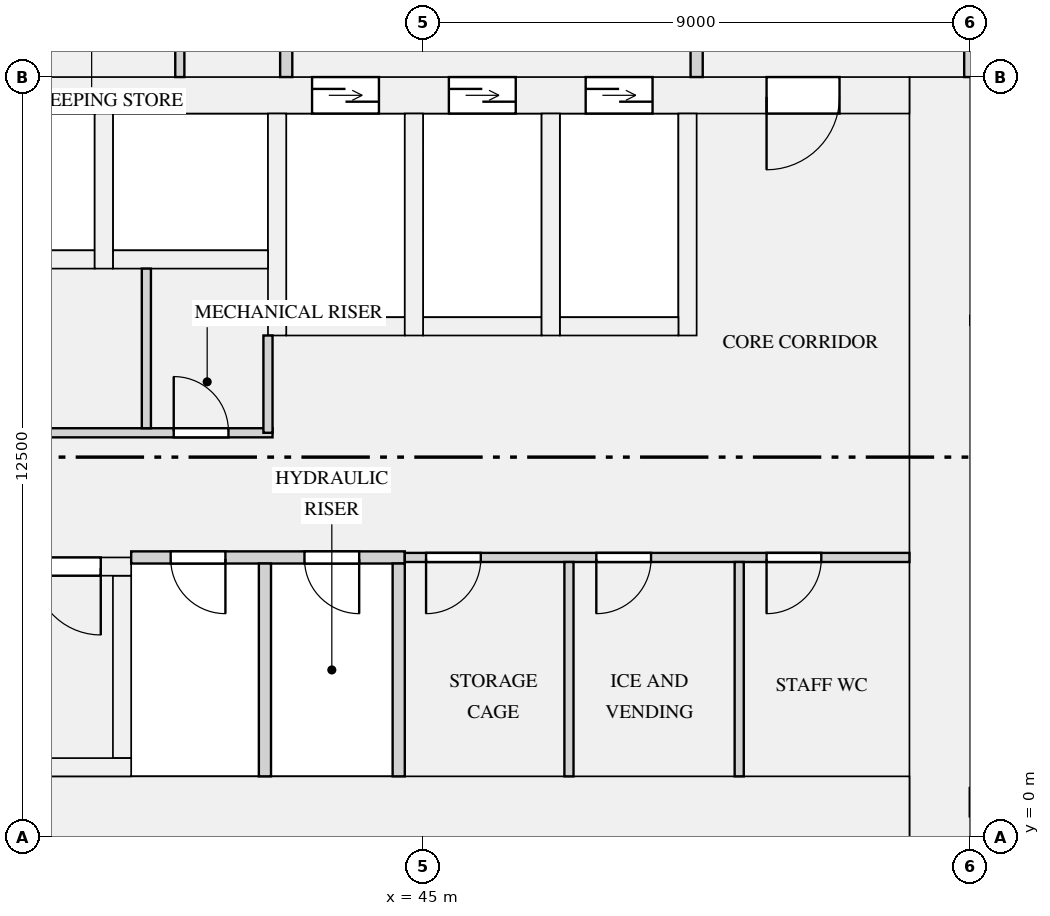
"""IFC4 building model, lengths in metres.
Left out: names, types, materials, properties, quantities, classifications, styles, units other than length and angle.
Written with IfcOpenShell. Run it as: python <this file> out.ifc"""

import sys

from ifc_helpers import new_model, si_unit, direction, frame, frame_2d, origin, place, context, subcontext, project, spatial, rectangle, extrude, element, fill, save


model = new_model("IFC4")
c1 = context("Model", 3, precision=1e-05, world=origin(), true_north=direction((0.0, 1.0)))
c2 = subcontext(c1, "Body", "Model", "MODEL_VIEW")
j1 = project(units=[si_unit("LENGTHUNIT", "METRE"), si_unit("PLANEANGLEUNIT", "RADIAN")], contexts=[c1])
p1 = place(None, origin())
s1 = spatial("IfcSite", under=j1, at=p1, CompositionType="ELEMENT")
p2 = place(p1, origin())
s2 = spatial("IfcBuilding", under=s1, at=p2, CompositionType="ELEMENT")
p3 = place(p2, frame((0.0, 0.0, 60.45)))
s3 = spatial("IfcBuildingStorey", under=s2, at=p3, CompositionType="ELEMENT", Elevation=60.45)
p4 = place(p3, frame((53.5, 0.0, 0.0), z_axis=(0.0, 0.0, 1.0), x_axis=(0.0, 1.0, 0.0)))
e1 = element("IfcWall", 1, at=p4, inside=s3, PredefinedType="SHEAR", context=c2, shape_type="SweptSolid", body=[
    extrude(rectangle(XDim=12.5, YDim=1.0, at=frame_2d((6.25, 0.0))), origin(), (0.0, 0.0, 1.0), 3.15),
])
p5 = place(p3, frame((19.0, 0.5, 0.0), z_axis=(0.0, 0.0, 1.0), x_axis=(1.0, 0.0, 0.0)))
e2 = element("IfcWall", 2, at=p5, inside=s3, PredefinedType="SHEAR", context=c2, shape_type="SweptSolid", body=[
    extrude(rectangle(XDim=34.0, YDim=1.0, at=frame_2d((17.0, 0.0))), origin(), (0.0, 0.0, 1.0), 3.15),
])
p6 = place(p3, frame((19.0, 12.2, 0.0), z_axis=(0.0, 0.0, 1.0), x_axis=(1.0, 0.0, 0.0)))
e3 = element("IfcWall", 3, at=p6, inside=s3, PredefinedType="SHEAR", context=c2, shape_type="SweptSolid", body=[
    extrude(rectangle(XDim=34.0, YDim=0.6, at=frame_2d((17.0, 0.0))), origin(), (0.0, 0.0, 1.0), 3.15),
])
p7 = place(p6, frame((4.475, 0.0, 0.0)))
e4 = element("IfcOpeningElement", 4, at=p7, cuts=e3, PredefinedType="OPENING", context=c2, shape_type="SweptSolid", body=[
    extrude(rectangle(XDim=1.2, YDim=2.1, at=frame_2d((0.6, 1.05))), frame((0.0, 0.31, 0.0), z_axis=(0.0, -1.0, 0.0), x_axis=(1.0, 0.0, 0.0)), (0.0, 0.0, 1.0), 0.62),
])
p8 = place(p6, frame((7.325, 0.0, 0.0)))
e5 = element("IfcOpeningElement", 5, at=p8, cuts=e3, PredefinedType="OPENING", context=c2, shape_type="SweptSolid", body=[
    extrude(rectangle(XDim=1.2, YDim=2.1, at=frame_2d((0.6, 1.05))), frame((0.0, 0.31, 0.0), z_axis=(0.0, -1.0, 0.0), x_axis=(1.0, 0.0, 0.0)), (0.0, 0.0, 1.0), 0.62),
])
p9 = place(p6, frame((10.175, 0.0, 0.0)))
e6 = element("IfcOpeningElement", 6, at=p9, cuts=e3, PredefinedType="OPENING", context=c2, shape_type="SweptSolid", body=[
    extrude(rectangle(XDim=1.2, YDim=2.1, at=frame_2d((0.6, 1.05))), frame((0.0, 0.31, 0.0), z_axis=(0.0, -1.0, 0.0), x_axis=(1.0, 0.0, 0.0)), (0.0, 0.0, 1.0), 0.62),
])
p10 = place(p6, frame((13.025, 0.0, 0.0)))
e7 = element("IfcOpeningElement", 7, at=p10, cuts=e3, PredefinedType="OPENING", context=c2, shape_type="SweptSolid", body=[
    extrude(rectangle(XDim=1.2, YDim=2.1, at=frame_2d((0.6, 1.05))), frame((0.0, 0.31, 0.0), z_axis=(0.0, -1.0, 0.0), x_axis=(1.0, 0.0, 0.0)), (0.0, 0.0, 1.0), 0.62),
])
p11 = place(p6, frame((15.875, 0.0, 0.0)))
e8 = element("IfcOpeningElement", 8, at=p11, cuts=e3, PredefinedType="OPENING", context=c2, shape_type="SweptSolid", body=[
    extrude(rectangle(XDim=1.2, YDim=2.1, at=frame_2d((0.6, 1.05))), frame((0.0, 0.31, 0.0), z_axis=(0.0, -1.0, 0.0), x_axis=(1.0, 0.0, 0.0)), (0.0, 0.0, 1.0), 0.62),
])
p12 = place(p6, frame((24.175, 0.0, 0.0)))
e9 = element("IfcOpeningElement", 9, at=p12, cuts=e3, PredefinedType="OPENING", context=c2, shape_type="SweptSolid", body=[
    extrude(rectangle(XDim=1.1, YDim=2.1, at=frame_2d((0.55, 1.05))), frame((0.0, 0.31, 0.0), z_axis=(0.0, -1.0, 0.0), x_axis=(1.0, 0.0, 0.0)), (0.0, 0.0, 1.0), 0.62),
])
p13 = place(p6, frame((26.425, 0.0, 0.0)))
e10 = element("IfcOpeningElement", 10, at=p13, cuts=e3, PredefinedType="OPENING", context=c2, shape_type="SweptSolid", body=[
    extrude(rectangle(XDim=1.1, YDim=2.1, at=frame_2d((0.55, 1.05))), frame((0.0, 0.31, 0.0), z_axis=(0.0, -1.0, 0.0), x_axis=(1.0, 0.0, 0.0)), (0.0, 0.0, 1.0), 0.62),
])
p14 = place(p6, frame((28.675, 0.0, 0.0)))
e11 = element("IfcOpeningElement", 11, at=p14, cuts=e3, PredefinedType="OPENING", context=c2, shape_type="SweptSolid", body=[
    extrude(rectangle(XDim=1.1, YDim=2.1, at=frame_2d((0.55, 1.05))), frame((0.0, 0.31, 0.0), z_axis=(0.0, -1.0, 0.0), x_axis=(1.0, 0.0, 0.0)), (0.0, 0.0, 1.0), 0.62),
])
p15 = place(p6, frame((1.15, 0.0, 0.0)))
e12 = element("IfcOpeningElement", 12, at=p15, cuts=e3, PredefinedType="OPENING", context=c2, shape_type="SweptSolid", body=[
    extrude(rectangle(XDim=1.2, YDim=2.1, at=frame_2d((0.6, 1.05))), frame((0.0, 0.31, 0.0), z_axis=(0.0, -1.0, 0.0), x_axis=(1.0, 0.0, 0.0)), (0.0, 0.0, 1.0), 0.62),
])
p16 = place(p6, frame((31.65, 0.0, 0.0)))
e13 = element("IfcOpeningElement", 13, at=p16, cuts=e3, PredefinedType="OPENING", context=c2, shape_type="SweptSolid", body=[
    extrude(rectangle(XDim=1.2, YDim=2.1, at=frame_2d((0.6, 1.05))), frame((0.0, 0.31, 0.0), z_axis=(0.0, -1.0, 0.0), x_axis=(1.0, 0.0, 0.0)), (0.0, 0.0, 1.0), 0.62),
])
for number, where, z_axis, x_axis in (
    (14, (37.05, 9.5, 0.0), (0.0, 0.0, 1.0), (1.0, 0.0, 0.0)),
    (15, (39.9, 9.5, 0.0), (0.0, 0.0, 1.0), (1.0, 0.0, 0.0)),
):
    element("IfcWall", number, at=place(p3, frame(where, z_axis=z_axis, x_axis=x_axis)), inside=s3, PredefinedType="SHEAR", context=c2, shape_type="SweptSolid", body=[
        extrude(rectangle(XDim=2.55, YDim=0.3, at=frame_2d((1.275, 0.0))), origin(), (0.0, 0.0, 1.0), 3.15),
    ])
p17 = place(p3, frame((39.75, 9.35, 0.0), z_axis=(0.0, 0.0, 1.0), x_axis=(0.0, 1.0, 0.0)))
e16 = element("IfcWall", 16, at=p17, inside=s3, PredefinedType="SHEAR", context=c2, shape_type="SweptSolid", body=[
    extrude(rectangle(XDim=2.55, YDim=0.3, at=frame_2d((1.275, 0.0))), origin(), (0.0, 0.0, 1.0), 3.15),
])
p18 = place(p3, frame((42.75, 8.4, 0.0), z_axis=(0.0, 0.0, 1.0), x_axis=(1.0, 0.0, 0.0)))
e17 = element("IfcWall", 17, at=p18, inside=s3, PredefinedType="SHEAR", context=c2, shape_type="SweptSolid", body=[
    extrude(rectangle(XDim=1.95, YDim=0.3, at=frame_2d((0.975, 0.0))), origin(), (0.0, 0.0, 1.0), 3.15),
])
p19 = place(p3, frame((42.6, 8.25, 0.0), z_axis=(0.0, 0.0, 1.0), x_axis=(0.0, 1.0, 0.0)))
e18 = element("IfcWall", 18, at=p19, inside=s3, PredefinedType="SHEAR", context=c2, shape_type="SweptSolid", body=[
    extrude(rectangle(XDim=3.65, YDim=0.3, at=frame_2d((1.825, 0.0))), origin(), (0.0, 0.0, 1.0), 3.15),
])
p20 = place(p3, frame((45.0, 8.4, 0.0), z_axis=(0.0, 0.0, 1.0), x_axis=(1.0, 0.0, 0.0)))
e19 = element("IfcWall", 19, at=p20, inside=s3, PredefinedType="SHEAR", context=c2, shape_type="SweptSolid", body=[
    extrude(rectangle(XDim=1.95, YDim=0.3, at=frame_2d((0.975, 0.0))), origin(), (0.0, 0.0, 1.0), 3.15),
])
p21 = place(p3, frame((44.85, 8.25, 0.0), z_axis=(0.0, 0.0, 1.0), x_axis=(0.0, 1.0, 0.0)))
e20 = element("IfcWall", 20, at=p21, inside=s3, PredefinedType="SHEAR", context=c2, shape_type="SweptSolid", body=[
    extrude(rectangle(XDim=3.65, YDim=0.3, at=frame_2d((1.825, 0.0))), origin(), (0.0, 0.0, 1.0), 3.15),
])
p22 = place(p3, frame((47.25, 8.4, 0.0), z_axis=(0.0, 0.0, 1.0), x_axis=(1.0, 0.0, 0.0)))
e21 = element("IfcWall", 21, at=p22, inside=s3, PredefinedType="SHEAR", context=c2, shape_type="SweptSolid", body=[
    extrude(rectangle(XDim=1.95, YDim=0.3, at=frame_2d((0.975, 0.0))), origin(), (0.0, 0.0, 1.0), 3.15),
])
for number, where, z_axis, x_axis in (
    (22, (47.1, 8.25, 0.0), (0.0, 0.0, 1.0), (0.0, 1.0, 0.0)),
    (23, (49.35, 8.25, 0.0), (0.0, 0.0, 1.0), (0.0, 1.0, 0.0)),
):
    element("IfcWall", number, at=place(p3, frame(where, z_axis=z_axis, x_axis=x_axis)), inside=s3, PredefinedType="SHEAR", context=c2, shape_type="SweptSolid", body=[
        extrude(rectangle(XDim=3.65, YDim=0.3, at=frame_2d((1.825, 0.0))), origin(), (0.0, 0.0, 1.0), 3.15),
    ])
p23 = place(p3, frame((31.8, 1.15, 0.0), z_axis=(0.0, 0.0, 1.0), x_axis=(1.0, 0.0, 0.0)))
e24 = element("IfcWall", 24, at=p23, inside=s3, PredefinedType="SHEAR", context=c2, shape_type="SweptSolid", body=[
    extrude(rectangle(XDim=8.4, YDim=0.3, at=frame_2d((4.2, 0.0))), origin(), (0.0, 0.0, 1.0), 3.15),
])
p24 = place(p3, frame((31.8, 4.45, 0.0), z_axis=(0.0, 0.0, 1.0), x_axis=(1.0, 0.0, 0.0)))
e25 = element("IfcWall", 25, at=p24, inside=s3, PredefinedType="SHEAR", context=c2, shape_type="SweptSolid", body=[
    extrude(rectangle(XDim=8.4, YDim=0.3, at=frame_2d((4.2, 0.0))), origin(), (0.0, 0.0, 1.0), 3.15),
])
p25 = place(p24, frame((6.8, 0.0, 0.0)))
e26 = element("IfcOpeningElement", 26, at=p25, cuts=e25, PredefinedType="OPENING", context=c2, shape_type="SweptSolid", body=[
    extrude(rectangle(XDim=1.1, YDim=2.1, at=frame_2d((0.55, 1.05))), frame((0.0, 0.16, 0.0), z_axis=(0.0, -1.0, 0.0), x_axis=(1.0, 0.0, 0.0)), (0.0, 0.0, 1.0), 0.32),
])
p26 = place(p3, frame((40.05, 1.3, 0.0), z_axis=(0.0, 0.0, 1.0), x_axis=(0.0, 1.0, 0.0)))
e27 = element("IfcWall", 27, at=p26, inside=s3, PredefinedType="SHEAR", context=c2, shape_type="SweptSolid", body=[
    extrude(rectangle(XDim=3.0, YDim=0.3, at=frame_2d((1.5, 0.0))), origin(), (0.0, 0.0, 1.0), 3.15),
])
p27 = place(p3, frame((40.2, 4.6, 0.0), z_axis=(0.0, 0.0, 1.0), x_axis=(1.0, 0.0, 0.0)))
e28 = element("IfcWall", 28, at=p27, inside=s3, PredefinedType="PARTITIONING", context=c2, shape_type="SweptSolid", body=[
    extrude(rectangle(XDim=4.5, YDim=0.2, at=frame_2d((2.25, 0.0))), origin(), (0.0, 0.0, 1.0), 2.83),
])
p28 = place(p27, frame((0.65, 0.0, 0.0)))
e29 = element("IfcOpeningElement", 29, at=p28, cuts=e28, PredefinedType="OPENING", context=c2, shape_type="SweptSolid", body=[
    extrude(rectangle(XDim=0.9, YDim=2.1, at=frame_2d((0.45, 1.05))), frame((0.0, 0.11, 0.0), z_axis=(0.0, -1.0, 0.0), x_axis=(1.0, 0.0, 0.0)), (0.0, 0.0, 1.0), 0.22),
])
p29 = place(p27, frame((2.85, 0.0, 0.0)))
e30 = element("IfcOpeningElement", 30, at=p29, cuts=e28, PredefinedType="OPENING", context=c2, shape_type="SweptSolid", body=[
    extrude(rectangle(XDim=0.9, YDim=2.1, at=frame_2d((0.45, 1.05))), frame((0.0, 0.11, 0.0), z_axis=(0.0, -1.0, 0.0), x_axis=(1.0, 0.0, 0.0)), (0.0, 0.0, 1.0), 0.22),
])
p30 = place(p3, frame((44.7, 4.6, 0.0), z_axis=(0.0, 0.0, 1.0), x_axis=(1.0, 0.0, 0.0)))
e31 = element("IfcWall", 31, at=p30, inside=s3, PredefinedType="PARTITIONING", context=c2, shape_type="SweptSolid", body=[
    extrude(rectangle(XDim=8.3, YDim=0.15, at=frame_2d((4.15, 0.0))), origin(), (0.0, 0.0, 1.0), 2.83),
])
p31 = place(p30, frame((0.35, 0.0, 0.0)))
e32 = element("IfcOpeningElement", 32, at=p31, cuts=e31, PredefinedType="OPENING", context=c2, shape_type="SweptSolid", body=[
    extrude(rectangle(XDim=0.9, YDim=2.1, at=frame_2d((0.45, 1.05))), frame((0.0, 0.085, 0.0), z_axis=(0.0, -1.0, 0.0), x_axis=(1.0, 0.0, 0.0)), (0.0, 0.0, 1.0), 0.17),
])
p32 = place(p30, frame((3.15, 0.0, 0.0)))
e33 = element("IfcOpeningElement", 33, at=p32, cuts=e31, PredefinedType="OPENING", context=c2, shape_type="SweptSolid", body=[
    extrude(rectangle(XDim=0.9, YDim=2.1, at=frame_2d((0.45, 1.05))), frame((0.0, 0.085, 0.0), z_axis=(0.0, -1.0, 0.0), x_axis=(1.0, 0.0, 0.0)), (0.0, 0.0, 1.0), 0.17),
])
p33 = place(p30, frame((5.95, 0.0, 0.0)))
e34 = element("IfcOpeningElement", 34, at=p33, cuts=e31, PredefinedType="OPENING", context=c2, shape_type="SweptSolid", body=[
    extrude(rectangle(XDim=0.9, YDim=2.1, at=frame_2d((0.45, 1.05))), frame((0.0, 0.085, 0.0), z_axis=(0.0, -1.0, 0.0), x_axis=(1.0, 0.0, 0.0)), (0.0, 0.0, 1.0), 0.17),
])
p34 = place(p3, frame((35.375, 6.65, 0.0), z_axis=(0.0, 0.0, 1.0), x_axis=(1.0, 0.0, 0.0)))
e35 = element("IfcWall", 35, at=p34, inside=s3, PredefinedType="PARTITIONING", context=c2, shape_type="SweptSolid", body=[
    extrude(rectangle(XDim=7.15, YDim=0.15, at=frame_2d((3.575, 0.0))), origin(), (0.0, 0.0, 1.0), 2.83),
])
p35 = place(p34, frame((0.525, 0.0, 0.0)))
e36 = element("IfcOpeningElement", 36, at=p35, cuts=e35, PredefinedType="OPENING", context=c2, shape_type="SweptSolid", body=[
    extrude(rectangle(XDim=0.9, YDim=2.1, at=frame_2d((0.45, 1.05))), frame((0.0, 0.085, 0.0), z_axis=(0.0, -1.0, 0.0), x_axis=(1.0, 0.0, 0.0)), (0.0, 0.0, 1.0), 0.17),
])
p36 = place(p34, frame((5.525, 0.0, 0.0)))
e37 = element("IfcOpeningElement", 37, at=p36, cuts=e35, PredefinedType="OPENING", context=c2, shape_type="SweptSolid", body=[
    extrude(rectangle(XDim=0.9, YDim=2.1, at=frame_2d((0.45, 1.05))), frame((0.0, 0.085, 0.0), z_axis=(0.0, -1.0, 0.0), x_axis=(1.0, 0.0, 0.0)), (0.0, 0.0, 1.0), 0.17),
])
for number, where, z_axis, x_axis in (
    (38, (42.4, 1.0, 0.0), (0.0, 0.0, 1.0), (0.0, 1.0, 0.0)),
    (39, (44.6, 1.0, 0.0), (0.0, 0.0, 1.0), (0.0, 1.0, 0.0)),
):
    element("IfcWall", number, at=place(p3, frame(where, z_axis=z_axis, x_axis=x_axis)), inside=s3, PredefinedType="PARTITIONING", context=c2, shape_type="SweptSolid", body=[
        extrude(rectangle(XDim=3.5, YDim=0.2, at=frame_2d((1.75, 0.0))), origin(), (0.0, 0.0, 1.0), 2.83),
    ])
for number, where, z_axis, x_axis in (
    (40, (47.4, 1.0, 0.0), (0.0, 0.0, 1.0), (0.0, 1.0, 0.0)),
    (41, (50.2, 1.0, 0.0), (0.0, 0.0, 1.0), (0.0, 1.0, 0.0)),
):
    element("IfcWall", number, at=place(p3, frame(where, z_axis=z_axis, x_axis=x_axis)), inside=s3, PredefinedType="PARTITIONING", context=c2, shape_type="SweptSolid", body=[
        extrude(rectangle(XDim=3.525, YDim=0.15, at=frame_2d((1.762, 0.0))), origin(), (0.0, 0.0, 1.0), 2.83),
    ])
p37 = place(p3, frame((42.45, 6.65, 0.0), z_axis=(0.0, 0.0, 1.0), x_axis=(0.0, 1.0, 0.0)))
e42 = element("IfcWall", 42, at=p37, inside=s3, PredefinedType="PARTITIONING", context=c2, shape_type="SweptSolid", body=[
    extrude(rectangle(XDim=1.6, YDim=0.15, at=frame_2d((0.8, 0.0))), origin(), (0.0, 0.0, 1.0), 2.83),
])
p38 = place(p3, frame((40.45, 6.725, 0.0), z_axis=(0.0, 0.0, 1.0), x_axis=(0.0, 1.0, 0.0)))
e43 = element("IfcWall", 43, at=p38, inside=s3, PredefinedType="PARTITIONING", context=c2, shape_type="SweptSolid", body=[
    extrude(rectangle(XDim=2.625, YDim=0.15, at=frame_2d((1.312, 0.0))), origin(), (0.0, 0.0, 1.0), 2.83),
])
p39 = place(p3, frame((41.0, 12.5, 0.0), z_axis=(0.0, 0.0, 1.0), x_axis=(0.0, 1.0, 0.0)))
e44 = element("IfcWall", 44, at=p39, inside=s3, PredefinedType="PARTITIONING", context=c2, shape_type="SweptSolid", body=[
    extrude(rectangle(XDim=1.925, YDim=0.15, at=frame_2d((0.962, 0.0))), origin(), (0.0, 0.0, 1.0), 2.83),
])
p40 = place(p3, frame((42.75, 12.5, 0.0), z_axis=(0.0, 0.0, 1.0), x_axis=(0.0, 1.0, 0.0)))
e45 = element("IfcWall", 45, at=p40, inside=s3, PredefinedType="PARTITIONING", context=c2, shape_type="SweptSolid", body=[
    extrude(rectangle(XDim=3.4, YDim=0.2, at=frame_2d((1.7, 0.0))), origin(), (0.0, 0.0, 1.0), 2.83),
])
p41 = place(p40, frame((2.2, 0.0, 0.0)))
e46 = element("IfcOpeningElement", 46, at=p41, cuts=e45, PredefinedType="OPENING", context=c2, shape_type="SweptSolid", body=[
    extrude(rectangle(XDim=1.0, YDim=2.1, at=frame_2d((0.5, 1.05))), frame((0.0, 0.11, 0.0), z_axis=(0.0, -1.0, 0.0), x_axis=(1.0, 0.0, 0.0)), (0.0, 0.0, 1.0), 0.22),
])
p42 = place(p3, frame((49.5, 12.5, 0.0), z_axis=(0.0, 0.0, 1.0), x_axis=(0.0, 1.0, 0.0)))
e47 = element("IfcWall", 47, at=p42, inside=s3, PredefinedType="PARTITIONING", context=c2, shape_type="SweptSolid", body=[
    extrude(rectangle(XDim=3.4, YDim=0.2, at=frame_2d((1.7, 0.0))), origin(), (0.0, 0.0, 1.0), 2.83),
])
p43 = place(p42, frame((1.15, 0.0, 0.0)))
e48 = element("IfcOpeningElement", 48, at=p43, cuts=e47, PredefinedType="OPENING", context=c2, shape_type="SweptSolid", body=[
    extrude(rectangle(XDim=1.1, YDim=2.1, at=frame_2d((0.55, 1.05))), frame((0.0, 0.11, 0.0), z_axis=(0.0, -1.0, 0.0), x_axis=(1.0, 0.0, 0.0)), (0.0, 0.0, 1.0), 0.22),
])
p44 = place(p3, frame((54.0, 12.5, 0.0), z_axis=(0.0, 0.0, 1.0), x_axis=(0.0, 1.0, 0.0)))
e49 = element("IfcWall", 49, at=p44, inside=s3, PredefinedType="PARTITIONING", context=c2, shape_type="SweptSolid", body=[
    extrude(rectangle(XDim=3.4, YDim=0.2, at=frame_2d((1.7, 0.0))), origin(), (0.0, 0.0, 1.0), 2.83),
])
p45 = place(p12, origin())
e50 = element("IfcDoor", 50, at=p45, inside=s3, OperationType="DOUBLE_DOOR_SLIDING", PredefinedType="DOOR", context=c2, shape_type="SweptSolid", body=[
    extrude(rectangle(XDim=1.1, YDim=2.1, at=frame_2d((0.55, 1.05))), frame((0.0, 0.025, 0.0), z_axis=(0.0, -1.0, 0.0), x_axis=(1.0, 0.0, 0.0)), (0.0, 0.0, 1.0), 0.05),
])
fill(e9, e50)
p46 = place(p13, origin())
e51 = element("IfcDoor", 51, at=p46, inside=s3, OperationType="DOUBLE_DOOR_SLIDING", PredefinedType="DOOR", context=c2, shape_type="SweptSolid", body=[
    extrude(rectangle(XDim=1.1, YDim=2.1, at=frame_2d((0.55, 1.05))), frame((0.0, 0.025, 0.0), z_axis=(0.0, -1.0, 0.0), x_axis=(1.0, 0.0, 0.0)), (0.0, 0.0, 1.0), 0.05),
])
fill(e10, e51)
p47 = place(p14, origin())
e52 = element("IfcDoor", 52, at=p47, inside=s3, OperationType="DOUBLE_DOOR_SLIDING", PredefinedType="DOOR", context=c2, shape_type="SweptSolid", body=[
    extrude(rectangle(XDim=1.1, YDim=2.1, at=frame_2d((0.55, 1.05))), frame((0.0, 0.025, 0.0), z_axis=(0.0, -1.0, 0.0), x_axis=(1.0, 0.0, 0.0)), (0.0, 0.0, 1.0), 0.05),
])
fill(e11, e52)
p48 = place(p25, frame((1.1, 0.0, 0.0), z_axis=(0.0, 0.0, 1.0), x_axis=(-1.0, 0.0, 0.0)))
e53 = element("IfcDoor", 53, at=p48, inside=s3, OperationType="SINGLE_SWING_LEFT", PredefinedType="DOOR", context=c2, shape_type="SweptSolid", body=[
    extrude(rectangle(XDim=1.1, YDim=2.1, at=frame_2d((0.55, 1.05))), frame((0.0, 0.025, 0.0), z_axis=(0.0, -1.0, 0.0), x_axis=(1.0, 0.0, 0.0)), (0.0, 0.0, 1.0), 0.05),
])
fill(e26, e53)
p49 = place(p36, origin())
e54 = element("IfcDoor", 54, at=p49, inside=s3, OperationType="SINGLE_SWING_LEFT", PredefinedType="DOOR", context=c2, shape_type="SweptSolid", body=[
    extrude(rectangle(XDim=0.9, YDim=2.1, at=frame_2d((0.45, 1.05))), frame((0.0, 0.025, 0.0), z_axis=(0.0, -1.0, 0.0), x_axis=(1.0, 0.0, 0.0)), (0.0, 0.0, 1.0), 0.05),
])
fill(e37, e54)
p50 = place(p31, frame((0.9, 0.0, 0.0), z_axis=(0.0, 0.0, 1.0), x_axis=(-1.0, 0.0, 0.0)))
e55 = element("IfcDoor", 55, at=p50, inside=s3, OperationType="SINGLE_SWING_RIGHT", PredefinedType="DOOR", context=c2, shape_type="SweptSolid", body=[
    extrude(rectangle(XDim=0.9, YDim=2.1, at=frame_2d((0.45, 1.05))), frame((0.0, 0.025, 0.0), z_axis=(0.0, -1.0, 0.0), x_axis=(1.0, 0.0, 0.0)), (0.0, 0.0, 1.0), 0.05),
])
fill(e32, e55)
p51 = place(p32, frame((0.9, 0.0, 0.0), z_axis=(0.0, 0.0, 1.0), x_axis=(-1.0, 0.0, 0.0)))
e56 = element("IfcDoor", 56, at=p51, inside=s3, OperationType="SINGLE_SWING_RIGHT", PredefinedType="DOOR", context=c2, shape_type="SweptSolid", body=[
    extrude(rectangle(XDim=0.9, YDim=2.1, at=frame_2d((0.45, 1.05))), frame((0.0, 0.025, 0.0), z_axis=(0.0, -1.0, 0.0), x_axis=(1.0, 0.0, 0.0)), (0.0, 0.0, 1.0), 0.05),
])
fill(e33, e56)
p52 = place(p33, frame((0.9, 0.0, 0.0), z_axis=(0.0, 0.0, 1.0), x_axis=(-1.0, 0.0, 0.0)))
e57 = element("IfcDoor", 57, at=p52, inside=s3, OperationType="SINGLE_SWING_RIGHT", PredefinedType="DOOR", context=c2, shape_type="SweptSolid", body=[
    extrude(rectangle(XDim=0.9, YDim=2.1, at=frame_2d((0.45, 1.05))), frame((0.0, 0.025, 0.0), z_axis=(0.0, -1.0, 0.0), x_axis=(1.0, 0.0, 0.0)), (0.0, 0.0, 1.0), 0.05),
])
fill(e34, e57)
p53 = place(p28, frame((0.9, 0.0, 0.0), z_axis=(0.0, 0.0, 1.0), x_axis=(-1.0, 0.0, 0.0)))
e58 = element("IfcDoor", 58, at=p53, inside=s3, OperationType="SINGLE_SWING_LEFT", PredefinedType="DOOR", context=c2, shape_type="SweptSolid", body=[
    extrude(rectangle(XDim=0.9, YDim=2.1, at=frame_2d((0.45, 1.05))), frame((0.0, 0.025, 0.0), z_axis=(0.0, -1.0, 0.0), x_axis=(1.0, 0.0, 0.0)), (0.0, 0.0, 1.0), 0.05),
])
fill(e29, e58)
p54 = place(p29, frame((0.9, 0.0, 0.0), z_axis=(0.0, 0.0, 1.0), x_axis=(-1.0, 0.0, 0.0)))
e59 = element("IfcDoor", 59, at=p54, inside=s3, OperationType="SINGLE_SWING_LEFT", PredefinedType="DOOR", context=c2, shape_type="SweptSolid", body=[
    extrude(rectangle(XDim=0.9, YDim=2.1, at=frame_2d((0.45, 1.05))), frame((0.0, 0.025, 0.0), z_axis=(0.0, -1.0, 0.0), x_axis=(1.0, 0.0, 0.0)), (0.0, 0.0, 1.0), 0.05),
])
fill(e30, e59)
p55 = place(p16, frame((1.2, 0.0, 0.0), z_axis=(0.0, 0.0, 1.0), x_axis=(-1.0, 0.0, 0.0)))
e60 = element("IfcDoor", 60, at=p55, inside=s3, OperationType="SINGLE_SWING_RIGHT", PredefinedType="DOOR", context=c2, shape_type="SweptSolid", body=[
    extrude(rectangle(XDim=1.2, YDim=2.1, at=frame_2d((0.6, 1.05))), frame((0.0, 0.025, 0.0), z_axis=(0.0, -1.0, 0.0), x_axis=(1.0, 0.0, 0.0)), (0.0, 0.0, 1.0), 0.05),
])
fill(e13, e60)
save(model, sys.argv[1])
